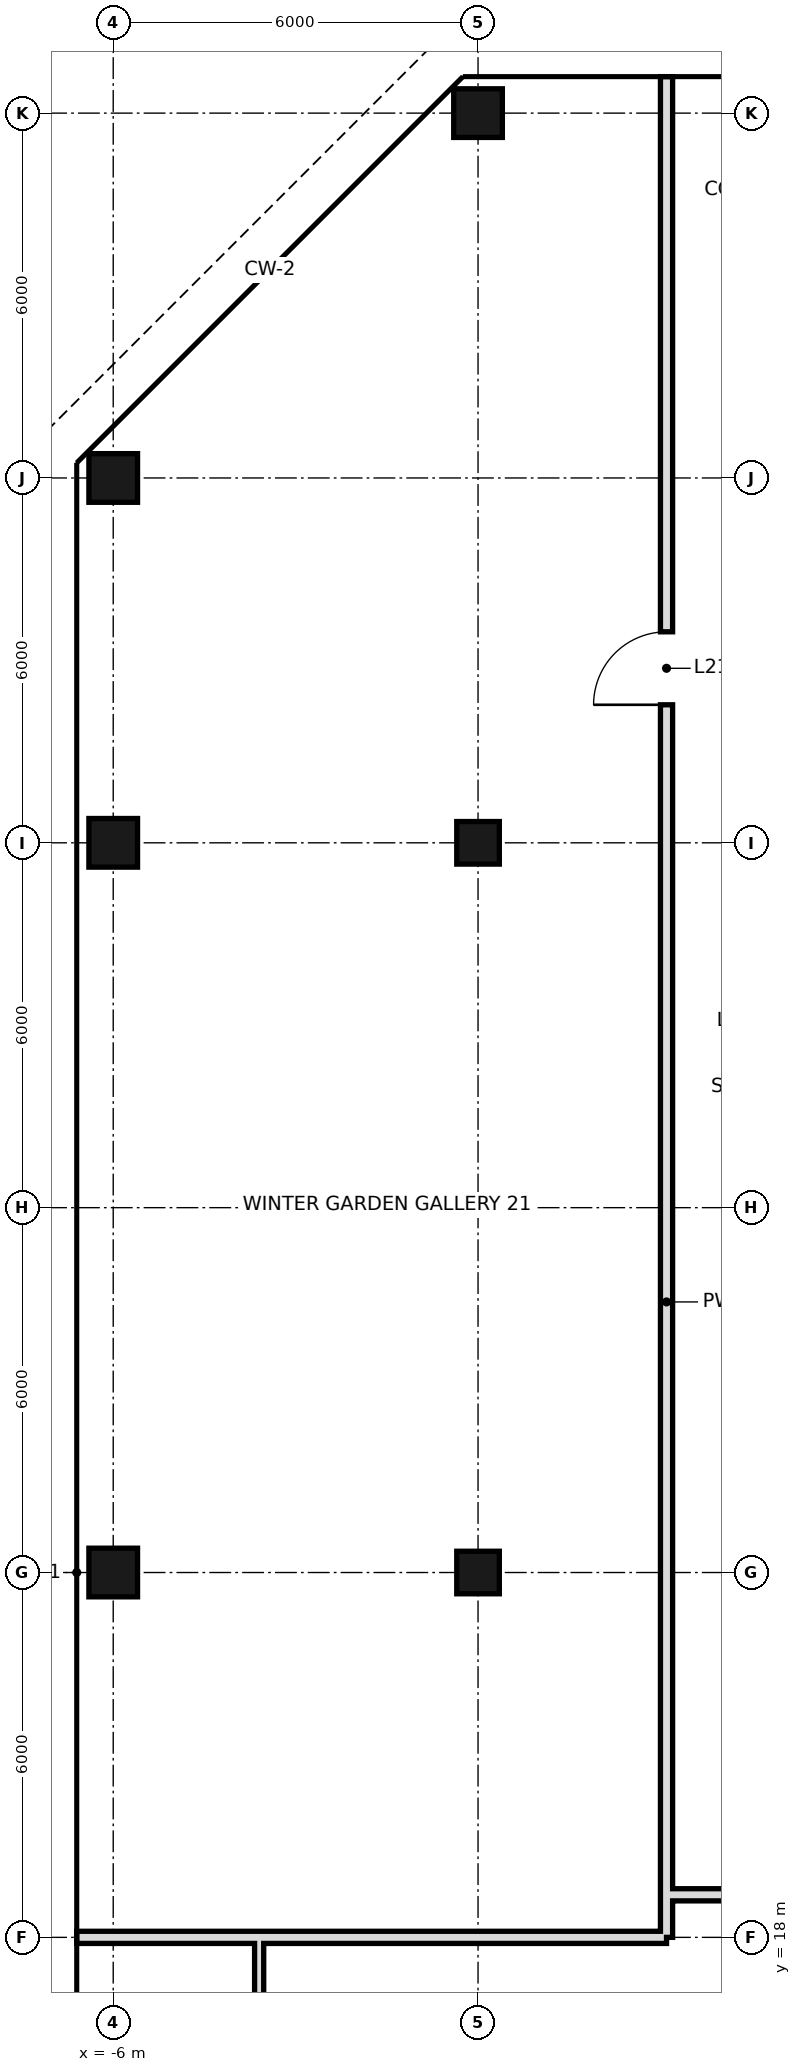
"""IFC4 building model, lengths in metres.
Left out: names, types, materials, properties, quantities, classifications, styles, units other than length and angle.
Written with IfcOpenShell. Run it as: python <this file> out.ifc"""

import sys

from ifc_helpers import new_model, si_unit, direction, frame, frame_2d, origin, origin_2d, place, context, subcontext, project, spatial, rectangle, hollow_rectangle, extrude, element, fill, save


model = new_model("IFC4")
c1 = context("Model", 3, precision=1e-05, world=origin(), true_north=direction((0.0, 1.0)))
c2 = subcontext(c1, "Body", "Model", "MODEL_VIEW")
j1 = project(units=[si_unit("LENGTHUNIT", "METRE"), si_unit("PLANEANGLEUNIT", "RADIAN")], contexts=[c1])
p1 = place(None, origin())
s1 = spatial("IfcSite", under=j1, at=p1, CompositionType="ELEMENT")
p2 = place(p1, origin())
s2 = spatial("IfcBuilding", under=s1, at=p2, CompositionType="ELEMENT")
p3 = place(p2, frame((0.0, 0.0, 99.8)))
s3 = spatial("IfcBuildingStorey", under=s2, at=p3, CompositionType="ELEMENT", Elevation=99.8)
for number, where, z_axis, x_axis in (
    (1, (-6.0, 24.0, 0.0), (0.0, 0.0, 1.0), (1.0, 0.0, 0.0)),
    (2, (-6.0, 36.0, 0.0), (0.0, 0.0, 1.0), (1.0, 0.0, 0.0)),
    (3, (-6.0, 42.0, 0.0), (0.0, 0.0, 1.0), (1.0, 0.0, 0.0)),
):
    element("IfcColumn", number, at=place(p3, frame(where, z_axis=z_axis, x_axis=x_axis)), inside=s3, PredefinedType="COLUMN", context=c2, shape_type="SweptSolid", body=[
        extrude(hollow_rectangle(XDim=0.8, YDim=0.8, WallThickness=0.04, at=origin_2d()), origin(), (0.0, 0.0, 1.0), 3.6),
    ])
for number, where, z_axis, x_axis in (
    (4, (0.0, 24.0, 0.0), (0.0, 0.0, 1.0), (1.0, 0.0, 0.0)),
    (5, (0.0, 36.0, 0.0), (0.0, 0.0, 1.0), (1.0, 0.0, 0.0)),
):
    element("IfcColumn", number, at=place(p3, frame(where, z_axis=z_axis, x_axis=x_axis)), inside=s3, PredefinedType="COLUMN", context=c2, shape_type="SweptSolid", body=[
        extrude(hollow_rectangle(XDim=0.7, YDim=0.7, WallThickness=0.036, at=origin_2d()), origin(), (0.0, 0.0, 1.0), 3.6),
    ])
p4 = place(p3, frame((0.0, 48.0, 0.0), z_axis=(0.0, 0.0, 1.0), x_axis=(1.0, 0.0, 0.0)))
e6 = element("IfcColumn", 6, at=p4, inside=s3, PredefinedType="COLUMN", context=c2, shape_type="SweptSolid", body=[
    extrude(hollow_rectangle(XDim=0.8, YDim=0.8, WallThickness=0.04, at=origin_2d()), origin(), (0.0, 0.0, 1.0), 3.6),
])
p5 = place(p3, frame((-3.6, 10.8, 0.0), z_axis=(0.0, 0.0, 1.0), x_axis=(0.0, 1.0, 0.0)))
e7 = element("IfcWall", 7, at=p5, inside=s3, PredefinedType="PARTITIONING", context=c2, shape_type="SweptSolid", body=[
    extrude(rectangle(XDim=7.2, YDim=0.15, at=frame_2d((3.6, 0.0))), origin(), (0.0, 0.0, 1.0), 3.42),
])
p6 = place(p3, frame((3.1, 18.0, 0.0), z_axis=(0.0, 0.0, 1.0), x_axis=(0.0, 1.0, 0.0)))
e8 = element("IfcWall", 8, at=p6, inside=s3, PredefinedType="SOLIDWALL", context=c2, shape_type="SweptSolid", body=[
    extrude(rectangle(XDim=30.6, YDim=0.2, at=frame_2d((15.3, 0.0))), origin(), (0.0, 0.0, 1.0), 2.72),
])
p7 = place(p6, frame((20.27, 0.0, 0.0)))
e9 = element("IfcOpeningElement", 9, at=p7, cuts=e8, PredefinedType="OPENING", context=c2, shape_type="SweptSolid", body=[
    extrude(rectangle(XDim=1.2, YDim=2.4, at=frame_2d((0.6, 1.2))), frame((0.0, 0.11, 0.0), z_axis=(0.0, -1.0, 0.0), x_axis=(1.0, 0.0, 0.0)), (0.0, 0.0, 1.0), 0.22),
])
p8 = place(p3, frame((-6.6, 18.0, 0.0), z_axis=(0.0, 0.0, 1.0), x_axis=(1.0, 0.0, 0.0)))
e10 = element("IfcWall", 10, at=p8, inside=s3, PredefinedType="SOLIDWALL", context=c2, shape_type="SweptSolid", body=[
    extrude(rectangle(XDim=9.7, YDim=0.2, at=frame_2d((4.85, 0.0))), origin(), (0.0, 0.0, 1.0), 2.72),
])
p9 = place(p3, frame((3.1, 18.7, 0.0), z_axis=(0.0, 0.0, 1.0), x_axis=(1.0, 0.0, 0.0)))
e11 = element("IfcWall", 11, at=p9, inside=s3, PredefinedType="SOLIDWALL", context=c2, shape_type="SweptSolid", body=[
    extrude(rectangle(XDim=4.7, YDim=0.2, at=frame_2d((2.35, 0.0))), origin(), (0.0, 0.0, 1.0), 2.72),
])
p10 = place(p7, origin())
e12 = element("IfcDoor", 12, at=p10, inside=s3, OperationType="SINGLE_SWING_LEFT", PredefinedType="DOOR", context=c2, shape_type="SweptSolid", body=[
    extrude(rectangle(XDim=1.2, YDim=2.4, at=frame_2d((0.6, 1.2))), frame((0.0, 0.025, 0.0), z_axis=(0.0, -1.0, 0.0), x_axis=(1.0, 0.0, 0.0)), (0.0, 0.0, 1.0), 0.05),
])
fill(e9, e12)
save(model, sys.argv[1])
